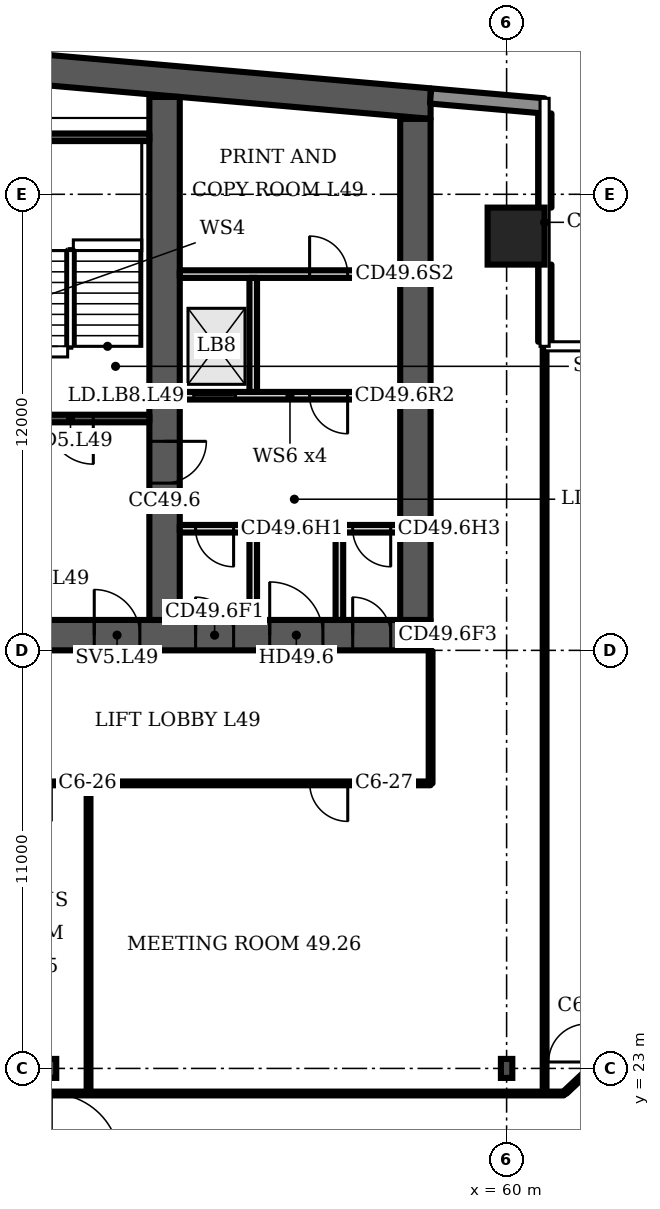
"""IFC4 building model, lengths in metres.
Left out: names, types, materials, properties, quantities, classifications, styles, units other than length and angle.
Written with IfcOpenShell. Run it as: python <this file> out.ifc"""

import sys

from ifc_helpers import new_model, si_unit, direction, frame, frame_2d, origin, origin_2d, place, context, subcontext, project, spatial, polyline, rectangle, i_section, outline, extrude, element, fill, save


model = new_model("IFC4")
c1 = context("Model", 3, precision=1e-05, world=origin(), true_north=direction((0.0, 1.0)))
c2 = subcontext(c1, "Body", "Model", "MODEL_VIEW")
j1 = project(units=[si_unit("LENGTHUNIT", "METRE"), si_unit("PLANEANGLEUNIT", "RADIAN")], contexts=[c1])
p1 = place(None, origin())
s1 = spatial("IfcSite", under=j1, at=p1, CompositionType="ELEMENT")
p2 = place(p1, origin())
s2 = spatial("IfcBuilding", under=s1, at=p2, CompositionType="ELEMENT")
p3 = place(p2, frame((0.0, 0.0, 198.7)))
s3 = spatial("IfcBuildingStorey", under=s2, at=p3, CompositionType="ELEMENT", Elevation=198.7)
p4 = place(p3, origin())
e1 = element("IfcWall", 1, at=p4, inside=s3, PredefinedType="SHEAR", context=c2, shape_type="SweptSolid", body=[
    extrude(outline(polyline([(16.0, 47.984), (37.0, 49.822), (58.0, 47.984), (58.0, 48.787), (37.0, 50.625), (16.0, 48.787), (16.0, 47.984)])), origin(), (0.0, 0.0, 1.0), 3.6),
])
p5 = place(p3, frame((16.0, 34.4, 0.0), z_axis=(0.0, 0.0, 1.0), x_axis=(1.0, 0.0, 0.0)))
e2 = element("IfcWall", 2, at=p5, inside=s3, PredefinedType="SHEAR", context=c2, shape_type="SweptSolid", body=[
    extrude(rectangle(XDim=42.0, YDim=0.8, at=frame_2d((21.0, 0.0))), origin(), (0.0, 0.0, 1.0), 3.6),
])
p6 = place(p5, frame((1.75, 0.0, 0.0)))
e3 = element("IfcOpeningElement", 3, at=p6, cuts=e2, PredefinedType="OPENING", context=c2, shape_type="SweptSolid", body=[
    extrude(rectangle(XDim=1.0, YDim=2.1, at=frame_2d((0.5, 1.05))), frame((0.0, 0.41, 0.0), z_axis=(0.0, -1.0, 0.0), x_axis=(1.0, 0.0, 0.0)), (0.0, 0.0, 1.0), 0.82),
])
p7 = place(p5, frame((4.65, 0.0, 0.0)))
e4 = element("IfcOpeningElement", 4, at=p7, cuts=e2, PredefinedType="OPENING", context=c2, shape_type="SweptSolid", body=[
    extrude(rectangle(XDim=1.0, YDim=2.1, at=frame_2d((0.5, 1.05))), frame((0.0, 0.41, 0.0), z_axis=(0.0, -1.0, 0.0), x_axis=(1.0, 0.0, 0.0)), (0.0, 0.0, 1.0), 0.82),
])
p8 = place(p5, frame((7.65, 0.0, 0.0)))
e5 = element("IfcOpeningElement", 5, at=p8, cuts=e2, PredefinedType="OPENING", context=c2, shape_type="SweptSolid", body=[
    extrude(rectangle(XDim=1.2, YDim=2.1, at=frame_2d((0.6, 1.05))), frame((0.0, 0.41, 0.0), z_axis=(0.0, -1.0, 0.0), x_axis=(1.0, 0.0, 0.0)), (0.0, 0.0, 1.0), 0.82),
])
p9 = place(p5, frame((14.767, 0.0, 0.0)))
e6 = element("IfcOpeningElement", 6, at=p9, cuts=e2, PredefinedType="OPENING", context=c2, shape_type="SweptSolid", body=[
    extrude(rectangle(XDim=1.1, YDim=2.1, at=frame_2d((0.55, 1.05))), frame((0.0, 0.41, 0.0), z_axis=(0.0, -1.0, 0.0), x_axis=(1.0, 0.0, 0.0)), (0.0, 0.0, 1.0), 0.82),
])
p10 = place(p5, frame((19.133, 0.0, 0.0)))
e7 = element("IfcOpeningElement", 7, at=p10, cuts=e2, PredefinedType="OPENING", context=c2, shape_type="SweptSolid", body=[
    extrude(rectangle(XDim=1.1, YDim=2.1, at=frame_2d((0.55, 1.05))), frame((0.0, 0.41, 0.0), z_axis=(0.0, -1.0, 0.0), x_axis=(1.0, 0.0, 0.0)), (0.0, 0.0, 1.0), 0.82),
])
p11 = place(p5, frame((16.8, 0.0, 0.0)))
e8 = element("IfcOpeningElement", 8, at=p11, cuts=e2, PredefinedType="OPENING", context=c2, shape_type="SweptSolid", body=[
    extrude(rectangle(XDim=1.4, YDim=2.1, at=frame_2d((0.7, 1.05))), frame((0.0, 0.41, 0.0), z_axis=(0.0, -1.0, 0.0), x_axis=(1.0, 0.0, 0.0)), (0.0, 0.0, 1.0), 0.82),
])
p12 = place(p5, frame((21.767, 0.0, 0.0)))
e9 = element("IfcOpeningElement", 9, at=p12, cuts=e2, PredefinedType="OPENING", context=c2, shape_type="SweptSolid", body=[
    extrude(rectangle(XDim=1.1, YDim=2.1, at=frame_2d((0.55, 1.05))), frame((0.0, 0.41, 0.0), z_axis=(0.0, -1.0, 0.0), x_axis=(1.0, 0.0, 0.0)), (0.0, 0.0, 1.0), 0.82),
])
p13 = place(p5, frame((23.95, 0.0, 0.0)))
e10 = element("IfcOpeningElement", 10, at=p13, cuts=e2, PredefinedType="OPENING", context=c2, shape_type="SweptSolid", body=[
    extrude(rectangle(XDim=1.1, YDim=2.1, at=frame_2d((0.55, 1.05))), frame((0.0, 0.41, 0.0), z_axis=(0.0, -1.0, 0.0), x_axis=(1.0, 0.0, 0.0)), (0.0, 0.0, 1.0), 0.82),
])
p14 = place(p5, frame((26.133, 0.0, 0.0)))
e11 = element("IfcOpeningElement", 11, at=p14, cuts=e2, PredefinedType="OPENING", context=c2, shape_type="SweptSolid", body=[
    extrude(rectangle(XDim=1.1, YDim=2.1, at=frame_2d((0.55, 1.05))), frame((0.0, 0.41, 0.0), z_axis=(0.0, -1.0, 0.0), x_axis=(1.0, 0.0, 0.0)), (0.0, 0.0, 1.0), 0.82),
])
p15 = place(p5, frame((33.15, 0.0, 0.0)))
e12 = element("IfcOpeningElement", 12, at=p15, cuts=e2, PredefinedType="OPENING", context=c2, shape_type="SweptSolid", body=[
    extrude(rectangle(XDim=1.2, YDim=2.1, at=frame_2d((0.6, 1.05))), frame((0.0, 0.41, 0.0), z_axis=(0.0, -1.0, 0.0), x_axis=(1.0, 0.0, 0.0)), (0.0, 0.0, 1.0), 0.82),
])
p16 = place(p5, frame((35.817, 0.0, 0.0)))
e13 = element("IfcOpeningElement", 13, at=p16, cuts=e2, PredefinedType="OPENING", context=c2, shape_type="SweptSolid", body=[
    extrude(rectangle(XDim=1.0, YDim=2.1, at=frame_2d((0.5, 1.05))), frame((0.0, 0.41, 0.0), z_axis=(0.0, -1.0, 0.0), x_axis=(1.0, 0.0, 0.0)), (0.0, 0.0, 1.0), 0.82),
])
p17 = place(p5, frame((39.95, 0.0, 0.0)))
e14 = element("IfcOpeningElement", 14, at=p17, cuts=e2, PredefinedType="OPENING", context=c2, shape_type="SweptSolid", body=[
    extrude(rectangle(XDim=1.0, YDim=2.1, at=frame_2d((0.5, 1.05))), frame((0.0, 0.41, 0.0), z_axis=(0.0, -1.0, 0.0), x_axis=(1.0, 0.0, 0.0)), (0.0, 0.0, 1.0), 0.82),
])
p18 = place(p5, frame((37.767, 0.0, 0.0)))
e15 = element("IfcOpeningElement", 15, at=p18, cuts=e2, PredefinedType="OPENING", context=c2, shape_type="SweptSolid", body=[
    extrude(rectangle(XDim=1.4, YDim=2.1, at=frame_2d((0.7, 1.05))), frame((0.0, 0.41, 0.0), z_axis=(0.0, -1.0, 0.0), x_axis=(1.0, 0.0, 0.0)), (0.0, 0.0, 1.0), 0.82),
])
p19 = place(p3, frame((51.0, 34.8, 0.0), z_axis=(0.0, 0.0, 1.0), x_axis=(0.0, 1.0, 0.0)))
e16 = element("IfcWall", 16, at=p19, inside=s3, PredefinedType="SHEAR", context=c2, shape_type="SweptSolid", body=[
    extrude(rectangle(XDim=13.762, YDim=0.8, at=frame_2d((6.881, 0.0))), origin(), (0.0, 0.0, 1.0), 3.6),
])
p20 = place(p19, frame((3.6, 0.0, 0.0)))
e17 = element("IfcOpeningElement", 17, at=p20, cuts=e16, PredefinedType="OPENING", context=c2, shape_type="SweptSolid", body=[
    extrude(rectangle(XDim=1.1, YDim=2.1, at=frame_2d((0.55, 1.05))), frame((0.0, 0.41, 0.0), z_axis=(0.0, -1.0, 0.0), x_axis=(1.0, 0.0, 0.0)), (0.0, 0.0, 1.0), 0.82),
])
p21 = place(p3, frame((57.6, 34.8, 0.0), z_axis=(0.0, 0.0, 1.0), x_axis=(0.0, 1.0, 0.0)))
e18 = element("IfcWall", 18, at=p21, inside=s3, PredefinedType="SHEAR", context=c2, shape_type="SweptSolid", body=[
    extrude(rectangle(XDim=13.184, YDim=0.8, at=frame_2d((6.592, 0.0))), origin(), (0.0, 0.0, 1.0), 3.6),
])
p22 = place(p3, frame((60.25, 44.9, 0.0), z_axis=(0.0, 0.0, 1.0), x_axis=(1.0, 0.0, 0.0)))
e19 = element("IfcColumn", 19, at=p22, inside=s3, PredefinedType="COLUMN", context=c2, shape_type="SweptSolid", body=[
    extrude(rectangle(XDim=1.5, YDim=1.5, at=origin_2d()), origin(), (0.0, 0.0, 1.0), 3.6),
])
for number, where, z_axis, x_axis in (
    (20, (48.0, 23.0, 0.0), (0.0, 0.0, 1.0), (1.0, 0.0, 0.0)),
    (21, (60.0, 23.0, 0.0), (0.0, 0.0, 1.0), (1.0, 0.0, 0.0)),
):
    element("IfcColumn", number, at=place(p3, frame(where, z_axis=z_axis, x_axis=x_axis)), inside=s3, PredefinedType="COLUMN", context=c2, shape_type="SweptSolid", body=[
        extrude(i_section(OverallWidth=0.3, OverallDepth=0.5, WebThickness=0.014, FlangeThickness=0.028, FilletRadius=0.027, at=origin_2d()), origin(), (0.0, 0.0, 1.0), 3.6),
    ])
p23 = place(p3, frame((60.983, 48.326, 0.0), z_axis=(0.0, 0.0, 1.0), x_axis=(-0.996194, 0.087168, 0.0)))
e22 = element("IfcWall", 22, at=p23, inside=s3, PredefinedType="SOLIDWALL", context=c2, shape_type="SweptSolid", body=[
    extrude(rectangle(XDim=2.994, YDim=0.4, at=frame_2d((1.497, 0.0))), origin(), (0.0, 0.0, 1.0), 3.15),
])
p24 = place(p3, frame((61.005, 42.12, 0.0), z_axis=(0.0, 0.0, 1.0), x_axis=(0.0, 1.0, 0.0)))
e23 = element("IfcWall", 23, at=p24, inside=s3, PredefinedType="SOLIDWALL", context=c2, shape_type="SweptSolid", body=[
    extrude(rectangle(XDim=2.03, YDim=0.35, at=frame_2d((1.015, 0.0))), origin(), (0.0, 0.0, 1.0), 1.0),
])
p25 = place(p3, frame((61.005, 45.65, 0.0), z_axis=(0.0, 0.0, 1.0), x_axis=(0.0, 1.0, 0.0)))
e24 = element("IfcWall", 24, at=p25, inside=s3, PredefinedType="SOLIDWALL", context=c2, shape_type="SweptSolid", body=[
    extrude(rectangle(XDim=2.477, YDim=0.35, at=frame_2d((1.238, 0.0))), origin(), (0.0, 0.0, 1.0), 1.0),
])
p26 = place(p3, frame((44.4, 40.1, 0.0), z_axis=(0.0, 0.0, 1.0), x_axis=(1.0, 0.0, 0.0)))
e25 = element("IfcWall", 25, at=p26, inside=s3, PredefinedType="SHEAR", context=c2, shape_type="SweptSolid", body=[
    extrude(rectangle(XDim=6.2, YDim=0.2, at=frame_2d((3.1, 0.0))), origin(), (0.0, 0.0, 1.0), 3.15),
])
p27 = place(p26, frame((3.525, 0.0, 0.0)))
e26 = element("IfcOpeningElement", 26, at=p27, cuts=e25, PredefinedType="OPENING", context=c2, shape_type="SweptSolid", body=[
    extrude(rectangle(XDim=1.2, YDim=2.1, at=frame_2d((0.6, 1.05))), frame((0.0, 0.11, 0.0), z_axis=(0.0, -1.0, 0.0), x_axis=(1.0, 0.0, 0.0)), (0.0, 0.0, 1.0), 0.22),
])
p28 = place(p26, frame((0.575, 0.0, 0.0)))
e27 = element("IfcOpeningElement", 27, at=p28, cuts=e25, PredefinedType="OPENING", context=c2, shape_type="SweptSolid", body=[
    extrude(rectangle(XDim=0.9, YDim=2.1, at=frame_2d((0.45, 1.05))), frame((0.0, 0.11, 0.0), z_axis=(0.0, -1.0, 0.0), x_axis=(1.0, 0.0, 0.0)), (0.0, 0.0, 1.0), 0.22),
])
p29 = place(p3, frame((46.75, 47.5, 0.0), z_axis=(0.0, 0.0, 1.0), x_axis=(1.0, 0.0, 0.0)))
e28 = element("IfcWall", 28, at=p29, inside=s3, PredefinedType="SHEAR", context=c2, shape_type="SweptSolid", body=[
    extrude(rectangle(XDim=3.85, YDim=0.2, at=frame_2d((1.925, 0.0))), origin(), (0.0, 0.0, 1.0), 3.15),
])
p30 = place(p3, frame((51.4, 37.2, 0.0), z_axis=(0.0, 0.0, 1.0), x_axis=(1.0, 0.0, 0.0)))
e29 = element("IfcWall", 29, at=p30, inside=s3, PredefinedType="PARTITIONING", context=c2, shape_type="SweptSolid", body=[
    extrude(rectangle(XDim=1.833, YDim=0.2, at=frame_2d((0.917, 0.0))), origin(), (0.0, 0.0, 1.0), 3.15),
])
p31 = place(p30, frame((0.417, 0.0, 0.0)))
e30 = element("IfcOpeningElement", 30, at=p31, cuts=e29, PredefinedType="OPENING", context=c2, shape_type="SweptSolid", body=[
    extrude(rectangle(XDim=1.0, YDim=2.1, at=frame_2d((0.5, 1.05))), frame((0.0, 0.11, 0.0), z_axis=(0.0, -1.0, 0.0), x_axis=(1.0, 0.0, 0.0)), (0.0, 0.0, 1.0), 0.22),
])
p32 = place(p3, frame((55.7, 37.2, 0.0), z_axis=(0.0, 0.0, 1.0), x_axis=(1.0, 0.0, 0.0)))
e31 = element("IfcWall", 31, at=p32, inside=s3, PredefinedType="PARTITIONING", context=c2, shape_type="SweptSolid", body=[
    extrude(rectangle(XDim=1.5, YDim=0.2, at=frame_2d((0.75, 0.0))), origin(), (0.0, 0.0, 1.0), 3.15),
])
p33 = place(p32, frame((0.25, 0.0, 0.0)))
e32 = element("IfcOpeningElement", 32, at=p33, cuts=e31, PredefinedType="OPENING", context=c2, shape_type="SweptSolid", body=[
    extrude(rectangle(XDim=1.0, YDim=2.1, at=frame_2d((0.5, 1.05))), frame((0.0, 0.11, 0.0), z_axis=(0.0, -1.0, 0.0), x_axis=(1.0, 0.0, 0.0)), (0.0, 0.0, 1.0), 0.22),
])
p34 = place(p3, frame((51.4, 40.7, 0.0), z_axis=(0.0, 0.0, 1.0), x_axis=(1.0, 0.0, 0.0)))
e33 = element("IfcWall", 33, at=p34, inside=s3, PredefinedType="PARTITIONING", context=c2, shape_type="SweptSolid", body=[
    extrude(rectangle(XDim=5.8, YDim=0.2, at=frame_2d((2.9, 0.0))), origin(), (0.0, 0.0, 1.0), 3.15),
])
p35 = place(p34, frame((0.367, 0.0, 0.0)))
e34 = element("IfcOpeningElement", 34, at=p35, cuts=e33, PredefinedType="OPENING", context=c2, shape_type="SweptSolid", body=[
    extrude(rectangle(XDim=1.1, YDim=2.1, at=frame_2d((0.55, 1.05))), frame((0.0, 0.11, 0.0), z_axis=(0.0, -1.0, 0.0), x_axis=(1.0, 0.0, 0.0)), (0.0, 0.0, 1.0), 0.22),
])
p36 = place(p34, frame((3.417, 0.0, 0.0)))
e35 = element("IfcOpeningElement", 35, at=p36, cuts=e33, PredefinedType="OPENING", context=c2, shape_type="SweptSolid", body=[
    extrude(rectangle(XDim=1.0, YDim=2.1, at=frame_2d((0.5, 1.05))), frame((0.0, 0.11, 0.0), z_axis=(0.0, -1.0, 0.0), x_axis=(1.0, 0.0, 0.0)), (0.0, 0.0, 1.0), 0.22),
])
p37 = place(p3, frame((51.4, 43.9, 0.0), z_axis=(0.0, 0.0, 1.0), x_axis=(1.0, 0.0, 0.0)))
e36 = element("IfcWall", 36, at=p37, inside=s3, PredefinedType="PARTITIONING", context=c2, shape_type="SweptSolid", body=[
    extrude(rectangle(XDim=5.8, YDim=0.2, at=frame_2d((2.9, 0.0))), origin(), (0.0, 0.0, 1.0), 3.15),
])
p38 = place(p37, frame((3.417, 0.0, 0.0)))
e37 = element("IfcOpeningElement", 37, at=p38, cuts=e36, PredefinedType="OPENING", context=c2, shape_type="SweptSolid", body=[
    extrude(rectangle(XDim=1.0, YDim=2.1, at=frame_2d((0.5, 1.05))), frame((0.0, 0.11, 0.0), z_axis=(0.0, -1.0, 0.0), x_axis=(1.0, 0.0, 0.0)), (0.0, 0.0, 1.0), 0.22),
])
p39 = place(p3, origin())
e38 = element("IfcWall", 38, at=p39, inside=s3, PredefinedType="PARTITIONING", context=c2, shape_type="SweptSolid", body=[
    extrude(outline(polyline([(53.233, 34.8), (53.233, 37.3), (53.433, 37.3), (53.433, 34.8), (53.233, 34.8)])), origin(), (0.0, 0.0, 1.0), 3.15),
])
p40 = place(p3, origin())
e39 = element("IfcWall", 39, at=p40, inside=s3, PredefinedType="PARTITIONING", context=c2, shape_type="SweptSolid", body=[
    extrude(outline(polyline([(55.5, 34.8), (55.5, 37.3), (55.7, 37.3), (55.7, 34.8), (55.5, 34.8)])), origin(), (0.0, 0.0, 1.0), 3.15),
])
p41 = place(p3, origin())
e40 = element("IfcWall", 40, at=p41, inside=s3, PredefinedType="PARTITIONING", context=c2, shape_type="SweptSolid", body=[
    extrude(outline(polyline([(53.433, 40.8), (53.433, 43.8), (53.233, 43.8), (53.233, 40.8), (53.433, 40.8)])), origin(), (0.0, 0.0, 1.0), 3.15),
])
p42 = place(p3, frame((18.955, 22.34, 0.0), z_axis=(0.0, 0.0, 1.0), x_axis=(1.0, 0.0, 0.0)))
e41 = element("IfcWall", 41, at=p42, inside=s3, PredefinedType="PARTITIONING", context=c2, shape_type="SweptSolid", body=[
    extrude(rectangle(XDim=42.555, YDim=0.1, at=frame_2d((21.277, 0.0))), origin(), (0.0, 0.0, 1.0), 3.15),
])
p43 = place(p42, frame((0.62, 0.0, 0.0)))
e42 = element("IfcOpeningElement", 42, at=p43, cuts=e41, PredefinedType="OPENING", context=c2, shape_type="SweptSolid", body=[
    extrude(rectangle(XDim=1.0, YDim=2.1, at=frame_2d((0.5, 1.05))), frame((0.0, 0.06, 0.0), z_axis=(0.0, -1.0, 0.0), x_axis=(1.0, 0.0, 0.0)), (0.0, 0.0, 1.0), 0.12),
])
p44 = place(p42, frame((8.62, 0.0, 0.0)))
e43 = element("IfcOpeningElement", 43, at=p44, cuts=e41, PredefinedType="OPENING", context=c2, shape_type="SweptSolid", body=[
    extrude(rectangle(XDim=1.0, YDim=2.1, at=frame_2d((0.5, 1.05))), frame((0.0, 0.06, 0.0), z_axis=(0.0, -1.0, 0.0), x_axis=(1.0, 0.0, 0.0)), (0.0, 0.0, 1.0), 0.12),
])
p45 = place(p3, frame((49.0, 22.34, 0.0), z_axis=(0.0, 0.0, 1.0), x_axis=(0.0, 1.0, 0.0)))
e44 = element("IfcWall", 44, at=p45, inside=s3, PredefinedType="PARTITIONING", context=c2, shape_type="SweptSolid", body=[
    extrude(rectangle(XDim=8.16, YDim=0.1, at=frame_2d((4.08, 0.0))), origin(), (0.0, 0.0, 1.0), 3.15),
])
p46 = place(p3, frame((58.0, 30.5, 0.0), z_axis=(0.0, 0.0, 1.0), x_axis=(0.0, 1.0, 0.0)))
e45 = element("IfcWall", 45, at=p46, inside=s3, PredefinedType="PARTITIONING", context=c2, shape_type="SweptSolid", body=[
    extrude(rectangle(XDim=3.48, YDim=0.1, at=frame_2d((1.74, 0.0))), origin(), (0.0, 0.0, 1.0), 3.15),
])
p47 = place(p3, frame((61.0, 22.34, 0.0), z_axis=(0.0, 0.0, 1.0), x_axis=(0.0, 1.0, 0.0)))
e46 = element("IfcWall", 46, at=p47, inside=s3, PredefinedType="PARTITIONING", context=c2, shape_type="SweptSolid", body=[
    extrude(rectangle(XDim=19.64, YDim=0.1, at=frame_2d((9.82, 0.0))), origin(), (0.0, 0.0, 1.0), 3.15),
])
p48 = place(p3, frame((61.54, 22.37, 0.0), z_axis=(0.0, 0.0, 1.0), x_axis=(0.72944, 0.684047, 0.0)))
e47 = element("IfcWall", 47, at=p48, inside=s3, PredefinedType="PARTITIONING", context=c2, shape_type="SweptSolid", body=[
    extrude(rectangle(XDim=0.774, YDim=0.1, at=frame_2d((0.387, 0.0))), origin(), (0.0, 0.0, 1.0), 3.15),
])
p49 = place(p3, frame((44.15, 30.5, 0.0), z_axis=(0.0, 0.0, 1.0), x_axis=(1.0, 0.0, 0.0)))
e48 = element("IfcWall", 48, at=p49, inside=s3, PredefinedType="PARTITIONING", context=c2, shape_type="SweptSolid", body=[
    extrude(rectangle(XDim=13.85, YDim=0.1, at=frame_2d((6.925, 0.0))), origin(), (0.0, 0.0, 1.0), 3.15),
])
p50 = place(p49, frame((0.37, 0.0, 0.0)))
e49 = element("IfcOpeningElement", 49, at=p50, cuts=e48, PredefinedType="OPENING", context=c2, shape_type="SweptSolid", body=[
    extrude(rectangle(XDim=1.0, YDim=2.1, at=frame_2d((0.5, 1.05))), frame((0.0, 0.06, 0.0), z_axis=(0.0, -1.0, 0.0), x_axis=(1.0, 0.0, 0.0)), (0.0, 0.0, 1.0), 0.12),
])
p51 = place(p49, frame((2.87, 0.0, 0.0)))
e50 = element("IfcOpeningElement", 50, at=p51, cuts=e48, PredefinedType="OPENING", context=c2, shape_type="SweptSolid", body=[
    extrude(rectangle(XDim=1.0, YDim=2.1, at=frame_2d((0.5, 1.05))), frame((0.0, 0.06, 0.0), z_axis=(0.0, -1.0, 0.0), x_axis=(1.0, 0.0, 0.0)), (0.0, 0.0, 1.0), 0.12),
])
p52 = place(p49, frame((10.67, 0.0, 0.0)))
e51 = element("IfcOpeningElement", 51, at=p52, cuts=e48, PredefinedType="OPENING", context=c2, shape_type="SweptSolid", body=[
    extrude(rectangle(XDim=1.0, YDim=2.1, at=frame_2d((0.5, 1.05))), frame((0.0, 0.06, 0.0), z_axis=(0.0, -1.0, 0.0), x_axis=(1.0, 0.0, 0.0)), (0.0, 0.0, 1.0), 0.12),
])
p53 = place(p27, origin())
e52 = element("IfcDoor", 52, at=p53, inside=s3, OperationType="SINGLE_SWING_RIGHT", PredefinedType="DOOR", context=c2, shape_type="SweptSolid", body=[
    extrude(rectangle(XDim=1.2, YDim=2.1, at=frame_2d((0.6, 1.05))), frame((0.0, 0.025, 0.0), z_axis=(0.0, -1.0, 0.0), x_axis=(1.0, 0.0, 0.0)), (0.0, 0.0, 1.0), 0.05),
])
fill(e26, e52)
p54 = place(p15, origin())
e53 = element("IfcDoor", 53, at=p54, inside=s3, OperationType="SINGLE_SWING_LEFT", PredefinedType="DOOR", context=c2, shape_type="SweptSolid", body=[
    extrude(rectangle(XDim=1.2, YDim=2.1, at=frame_2d((0.6, 1.05))), frame((0.0, 0.025, 0.0), z_axis=(0.0, -1.0, 0.0), x_axis=(1.0, 0.0, 0.0)), (0.0, 0.0, 1.0), 0.05),
])
fill(e12, e53)
p55 = place(p16, origin())
e54 = element("IfcDoor", 54, at=p55, inside=s3, OperationType="SINGLE_SWING_LEFT", PredefinedType="DOOR", context=c2, shape_type="SweptSolid", body=[
    extrude(rectangle(XDim=1.0, YDim=2.1, at=frame_2d((0.5, 1.05))), frame((0.0, 0.4, 0.0), z_axis=(0.0, -1.0, 0.0), x_axis=(1.0, 0.0, 0.0)), (0.0, 0.0, 1.0), 0.8),
])
fill(e13, e54)
p56 = place(p31, origin())
e55 = element("IfcDoor", 55, at=p56, inside=s3, OperationType="SINGLE_SWING_RIGHT", PredefinedType="DOOR", context=c2, shape_type="SweptSolid", body=[
    extrude(rectangle(XDim=1.0, YDim=2.1, at=frame_2d((0.5, 1.05))), frame((0.0, 0.025, 0.0), z_axis=(0.0, -1.0, 0.0), x_axis=(1.0, 0.0, 0.0)), (0.0, 0.0, 1.0), 0.05),
])
fill(e30, e55)
p57 = place(p17, origin())
e56 = element("IfcDoor", 56, at=p57, inside=s3, OperationType="SINGLE_SWING_LEFT", PredefinedType="DOOR", context=c2, shape_type="SweptSolid", body=[
    extrude(rectangle(XDim=1.0, YDim=2.1, at=frame_2d((0.5, 1.05))), frame((0.0, 0.4, 0.0), z_axis=(0.0, -1.0, 0.0), x_axis=(1.0, 0.0, 0.0)), (0.0, 0.0, 1.0), 0.8),
])
fill(e14, e56)
p58 = place(p33, origin())
e57 = element("IfcDoor", 57, at=p58, inside=s3, OperationType="SINGLE_SWING_RIGHT", PredefinedType="DOOR", context=c2, shape_type="SweptSolid", body=[
    extrude(rectangle(XDim=1.0, YDim=2.1, at=frame_2d((0.5, 1.05))), frame((0.0, 0.025, 0.0), z_axis=(0.0, -1.0, 0.0), x_axis=(1.0, 0.0, 0.0)), (0.0, 0.0, 1.0), 0.05),
])
fill(e32, e57)
p59 = place(p18, origin())
e58 = element("IfcDoor", 58, at=p59, inside=s3, OperationType="DOUBLE_DOOR_SINGLE_SWING", PredefinedType="DOOR", context=c2, shape_type="SweptSolid", body=[
    extrude(rectangle(XDim=1.4, YDim=2.1, at=frame_2d((0.7, 1.05))), frame((0.0, 0.025, 0.0), z_axis=(0.0, -1.0, 0.0), x_axis=(1.0, 0.0, 0.0)), (0.0, 0.0, 1.0), 0.05),
])
fill(e15, e58)
p60 = place(p35, origin())
e59 = element("IfcDoor", 59, at=p60, inside=s3, OperationType="DOUBLE_DOOR_SLIDING", PredefinedType="DOOR", context=c2, shape_type="SweptSolid", body=[
    extrude(rectangle(XDim=1.1, YDim=2.1, at=frame_2d((0.55, 1.05))), frame((0.0, 0.025, 0.0), z_axis=(0.0, -1.0, 0.0), x_axis=(1.0, 0.0, 0.0)), (0.0, 0.0, 1.0), 0.05),
])
fill(e34, e59)
p61 = place(p36, origin())
e60 = element("IfcDoor", 60, at=p61, inside=s3, OperationType="SINGLE_SWING_RIGHT", PredefinedType="DOOR", context=c2, shape_type="SweptSolid", body=[
    extrude(rectangle(XDim=1.0, YDim=2.1, at=frame_2d((0.5, 1.05))), frame((0.0, 0.025, 0.0), z_axis=(0.0, -1.0, 0.0), x_axis=(1.0, 0.0, 0.0)), (0.0, 0.0, 1.0), 0.05),
])
fill(e35, e60)
p62 = place(p38, origin())
e61 = element("IfcDoor", 61, at=p62, inside=s3, OperationType="SINGLE_SWING_LEFT", PredefinedType="DOOR", context=c2, shape_type="SweptSolid", body=[
    extrude(rectangle(XDim=1.0, YDim=2.1, at=frame_2d((0.5, 1.05))), frame((0.0, 0.025, 0.0), z_axis=(0.0, -1.0, 0.0), x_axis=(1.0, 0.0, 0.0)), (0.0, 0.0, 1.0), 0.05),
])
fill(e37, e61)
p63 = place(p20, origin())
e62 = element("IfcDoor", 62, at=p63, inside=s3, OperationType="SINGLE_SWING_RIGHT", PredefinedType="DOOR", context=c2, shape_type="SweptSolid", body=[
    extrude(rectangle(XDim=1.1, YDim=2.1, at=frame_2d((0.55, 1.05))), frame((0.0, 0.025, 0.0), z_axis=(0.0, -1.0, 0.0), x_axis=(1.0, 0.0, 0.0)), (0.0, 0.0, 1.0), 0.05),
])
fill(e17, e62)
p64 = place(p52, origin())
e63 = element("IfcDoor", 63, at=p64, inside=s3, OperationType="SINGLE_SWING_RIGHT", PredefinedType="DOOR", context=c2, shape_type="SweptSolid", body=[
    extrude(rectangle(XDim=1.0, YDim=2.1, at=frame_2d((0.5, 1.05))), frame((0.0, 0.025, 0.0), z_axis=(0.0, -1.0, 0.0), x_axis=(1.0, 0.0, 0.0)), (0.0, 0.0, 1.0), 0.05),
])
fill(e51, e63)
save(model, sys.argv[1])
